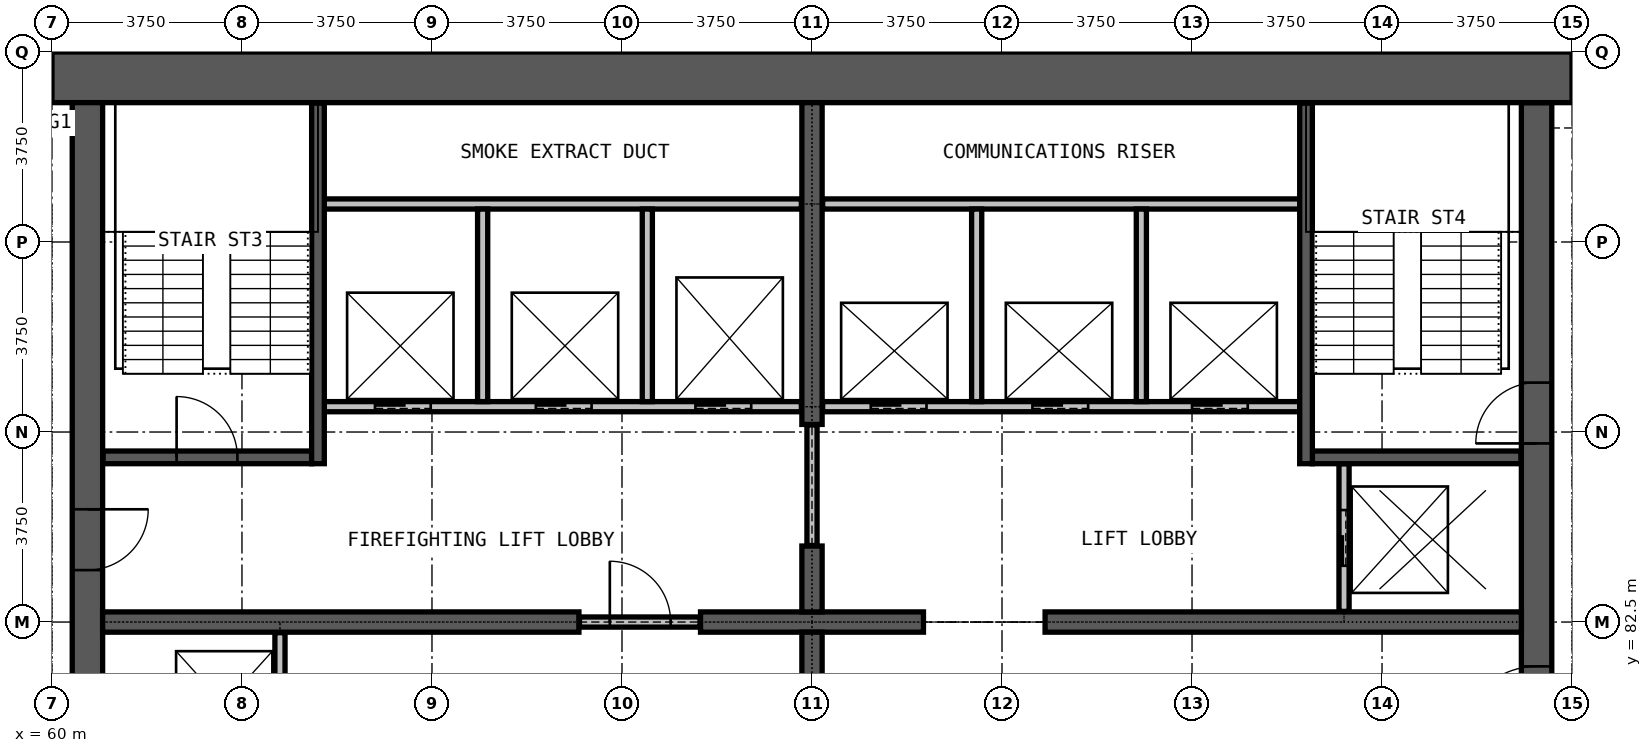
"""IFC4 building model, lengths in metres.
Left out: names, types, materials, properties, quantities, classifications, styles, units other than length and angle.
Written with IfcOpenShell. Run it as: python <this file> out.ifc"""

import sys

from ifc_helpers import new_model, si_unit, direction, frame, frame_2d, origin, place, context, subcontext, project, spatial, rectangle, extrude, element, fill, save


model = new_model("IFC4")
c1 = context("Model", 3, precision=1e-05, world=origin(), true_north=direction((0.0, 1.0)))
c2 = subcontext(c1, "Body", "Model", "MODEL_VIEW")
j1 = project(units=[si_unit("LENGTHUNIT", "METRE"), si_unit("PLANEANGLEUNIT", "RADIAN")], contexts=[c1])
p1 = place(None, origin())
s1 = spatial("IfcSite", under=j1, at=p1, CompositionType="ELEMENT")
p2 = place(p1, origin())
s2 = spatial("IfcBuilding", under=s1, at=p2, CompositionType="ELEMENT")
p3 = place(p2, frame((0.0, 0.0, 217.5)))
s3 = spatial("IfcBuildingStorey", under=s2, at=p3, CompositionType="ELEMENT", Elevation=217.5)
p4 = place(p3, frame((89.3, 72.25, 0.0), z_axis=(0.0, 0.0, 1.0), x_axis=(0.0, 1.0, 0.0)))
e1 = element("IfcWall", 1, at=p4, inside=s3, PredefinedType="SHEAR", context=c2, shape_type="SweptSolid", body=[
    extrude(rectangle(XDim=20.5, YDim=0.6, at=frame_2d((10.25, 0.0))), origin(), (0.0, 0.0, 1.0), 3.6),
])
p5 = place(p4, frame((0.275, 0.0, 0.0)))
e2 = element("IfcOpeningElement", 2, at=p5, cuts=e1, PredefinedType="OPENING", context=c2, shape_type="SweptSolid", body=[
    extrude(rectangle(XDim=1.2, YDim=2.2, at=frame_2d((0.6, 1.1))), frame((0.0, 0.31, 0.0), z_axis=(0.0, -1.0, 0.0), x_axis=(1.0, 0.0, 0.0)), (0.0, 0.0, 1.0), 0.62),
])
p6 = place(p4, frame((13.775, 0.0, 0.0)))
e3 = element("IfcOpeningElement", 3, at=p6, cuts=e1, PredefinedType="OPENING", context=c2, shape_type="SweptSolid", body=[
    extrude(rectangle(XDim=1.2, YDim=2.2, at=frame_2d((0.6, 1.1))), frame((0.0, 0.31, 0.0), z_axis=(0.0, -1.0, 0.0), x_axis=(1.0, 0.0, 0.0)), (0.0, 0.0, 1.0), 0.62),
])
p7 = place(p4, frame((7.875, 0.0, 0.0)))
e4 = element("IfcOpeningElement", 4, at=p7, cuts=e1, PredefinedType="OPENING", context=c2, shape_type="SweptSolid", body=[
    extrude(rectangle(XDim=1.5, YDim=2.2, at=frame_2d((0.75, 1.1))), frame((0.0, 0.31, 0.0), z_axis=(0.0, -1.0, 0.0), x_axis=(1.0, 0.0, 0.0)), (0.0, 0.0, 1.0), 0.62),
])
p8 = place(p3, frame((90.0, 93.25, 0.0), z_axis=(0.0, 0.0, 1.0), x_axis=(-1.0, 0.0, 0.0)))
e5 = element("IfcWall", 5, at=p8, inside=s3, PredefinedType="SHEAR", context=c2, shape_type="SweptSolid", body=[
    extrude(rectangle(XDim=30.0, YDim=1.0, at=frame_2d((15.0, 0.0))), origin(), (0.0, 0.0, 1.0), 3.6),
])
p9 = place(p3, frame((60.7, 92.75, 0.0), z_axis=(0.0, 0.0, 1.0), x_axis=(0.0, -1.0, 0.0)))
e6 = element("IfcWall", 6, at=p9, inside=s3, PredefinedType="SHEAR", context=c2, shape_type="SweptSolid", body=[
    extrude(rectangle(XDim=20.5, YDim=0.6, at=frame_2d((10.25, 0.0))), origin(), (0.0, 0.0, 1.0), 3.6),
])
p10 = place(p9, frame((19.025, 0.0, 0.0)))
e7 = element("IfcOpeningElement", 7, at=p10, cuts=e6, PredefinedType="OPENING", context=c2, shape_type="SweptSolid", body=[
    extrude(rectangle(XDim=1.2, YDim=2.2, at=frame_2d((0.6, 1.1))), frame((0.0, 0.31, 0.0), z_axis=(0.0, -1.0, 0.0), x_axis=(1.0, 0.0, 0.0)), (0.0, 0.0, 1.0), 0.62),
])
p11 = place(p9, frame((8.025, 0.0, 0.0)))
e8 = element("IfcOpeningElement", 8, at=p11, cuts=e6, PredefinedType="OPENING", context=c2, shape_type="SweptSolid", body=[
    extrude(rectangle(XDim=1.2, YDim=2.2, at=frame_2d((0.6, 1.1))), frame((0.0, 0.31, 0.0), z_axis=(0.0, -1.0, 0.0), x_axis=(1.0, 0.0, 0.0)), (0.0, 0.0, 1.0), 0.62),
])
p12 = place(p3, frame((61.0, 82.5, 0.0), z_axis=(0.0, 0.0, 1.0), x_axis=(1.0, 0.0, 0.0)))
e9 = element("IfcWall", 9, at=p12, inside=s3, PredefinedType="SHEAR", context=c2, shape_type="SweptSolid", body=[
    extrude(rectangle(XDim=9.4, YDim=0.4, at=frame_2d((4.7, 0.0))), origin(), (0.0, 0.0, 1.0), 3.6),
])
p13 = place(p3, frame((72.8, 82.5, 0.0), z_axis=(0.0, 0.0, 1.0), x_axis=(1.0, 0.0, 0.0)))
e10 = element("IfcWall", 10, at=p13, inside=s3, PredefinedType="SHEAR", context=c2, shape_type="SweptSolid", body=[
    extrude(rectangle(XDim=4.4, YDim=0.4, at=frame_2d((2.2, 0.0))), origin(), (0.0, 0.0, 1.0), 3.6),
])
p14 = place(p3, frame((79.6, 82.5, 0.0), z_axis=(0.0, 0.0, 1.0), x_axis=(1.0, 0.0, 0.0)))
e11 = element("IfcWall", 11, at=p14, inside=s3, PredefinedType="SHEAR", context=c2, shape_type="SweptSolid", body=[
    extrude(rectangle(XDim=9.4, YDim=0.4, at=frame_2d((4.7, 0.0))), origin(), (0.0, 0.0, 1.0), 3.6),
])
for number, where, z_axis, x_axis in (
    (12, (75.0, 81.0, 0.0), (0.0, 0.0, 1.0), (0.0, 1.0, 0.0)),
    (13, (75.0, 82.7, 0.0), (0.0, 0.0, 1.0), (0.0, 1.0, 0.0)),
):
    element("IfcWall", number, at=place(p3, frame(where, z_axis=z_axis, x_axis=x_axis)), inside=s3, PredefinedType="SHEAR", context=c2, shape_type="SweptSolid", body=[
        extrude(rectangle(XDim=1.3, YDim=0.4, at=frame_2d((0.65, 0.0))), origin(), (0.0, 0.0, 1.0), 3.6),
    ])
p15 = place(p3, frame((75.0, 86.4, 0.0), z_axis=(0.0, 0.0, 1.0), x_axis=(0.0, 1.0, 0.0)))
e14 = element("IfcWall", 14, at=p15, inside=s3, PredefinedType="SHEAR", context=c2, shape_type="SweptSolid", body=[
    extrude(rectangle(XDim=6.35, YDim=0.4, at=frame_2d((3.175, 0.0))), origin(), (0.0, 0.0, 1.0), 3.6),
])
p16 = place(p3, frame((70.41, 82.5, 0.0), z_axis=(0.0, 0.0, 1.0), x_axis=(1.0, 0.0, 0.0)))
e15 = element("IfcWall", 15, at=p16, inside=s3, PredefinedType="PARTITIONING", context=c2, shape_type="SweptSolid", body=[
    extrude(rectangle(XDim=2.38, YDim=0.2, at=frame_2d((1.19, 0.0))), origin(), (0.0, 0.0, 1.0), 2.4),
])
p17 = place(p16, frame((0.6, 0.0, 0.0)))
e16 = element("IfcOpeningElement", 16, at=p17, cuts=e15, PredefinedType="OPENING", context=c2, shape_type="SweptSolid", body=[
    extrude(rectangle(XDim=1.2, YDim=2.2, at=frame_2d((0.6, 1.1))), frame((0.0, 0.11, 0.0), z_axis=(0.0, -1.0, 0.0), x_axis=(1.0, 0.0, 0.0)), (0.0, 0.0, 1.0), 0.22),
])
p18 = place(p3, frame((75.0, 84.01, 0.0), z_axis=(0.0, 0.0, 1.0), x_axis=(0.0, 1.0, 0.0)))
e17 = element("IfcWall", 17, at=p18, inside=s3, PredefinedType="PARTITIONING", context=c2, shape_type="SweptSolid", body=[
    extrude(rectangle(XDim=2.38, YDim=0.2, at=frame_2d((1.19, 0.0))), origin(), (0.0, 0.0, 1.0), 2.4),
])
p19 = place(p3, frame((65.375, 86.75, 0.0), z_axis=(0.0, 0.0, 1.0), x_axis=(1.0, 0.0, 0.0)))
e18 = element("IfcWall", 18, at=p19, inside=s3, PredefinedType="PARTITIONING", context=c2, shape_type="SweptSolid", body=[
    extrude(rectangle(XDim=9.415, YDim=0.2, at=frame_2d((4.708, 0.0))), origin(), (0.0, 0.0, 1.0), 3.3),
])
p20 = place(p19, frame((1.0, 0.0, 0.0)))
e19 = element("IfcOpeningElement", 19, at=p20, cuts=e18, PredefinedType="OPENING", context=c2, shape_type="SweptSolid", body=[
    extrude(rectangle(XDim=1.1, YDim=2.2, at=frame_2d((0.55, 1.1))), frame((0.0, 0.11, 0.0), z_axis=(0.0, -1.0, 0.0), x_axis=(1.0, 0.0, 0.0)), (0.0, 0.0, 1.0), 0.22),
])
p21 = place(p19, frame((4.175, 0.0, 0.0)))
e20 = element("IfcOpeningElement", 20, at=p21, cuts=e18, PredefinedType="OPENING", context=c2, shape_type="SweptSolid", body=[
    extrude(rectangle(XDim=1.1, YDim=2.2, at=frame_2d((0.55, 1.1))), frame((0.0, 0.11, 0.0), z_axis=(0.0, -1.0, 0.0), x_axis=(1.0, 0.0, 0.0)), (0.0, 0.0, 1.0), 0.22),
])
p22 = place(p19, frame((7.325, 0.0, 0.0)))
e21 = element("IfcOpeningElement", 21, at=p22, cuts=e18, PredefinedType="OPENING", context=c2, shape_type="SweptSolid", body=[
    extrude(rectangle(XDim=1.1, YDim=2.2, at=frame_2d((0.55, 1.1))), frame((0.0, 0.11, 0.0), z_axis=(0.0, -1.0, 0.0), x_axis=(1.0, 0.0, 0.0)), (0.0, 0.0, 1.0), 0.22),
])
p23 = place(p3, frame((75.21, 86.75, 0.0), z_axis=(0.0, 0.0, 1.0), x_axis=(1.0, 0.0, 0.0)))
e22 = element("IfcWall", 22, at=p23, inside=s3, PredefinedType="PARTITIONING", context=c2, shape_type="SweptSolid", body=[
    extrude(rectangle(XDim=9.415, YDim=0.2, at=frame_2d((4.708, 0.0))), origin(), (0.0, 0.0, 1.0), 3.3),
])
p24 = place(p23, frame((0.95, 0.0, 0.0)))
e23 = element("IfcOpeningElement", 23, at=p24, cuts=e22, PredefinedType="OPENING", context=c2, shape_type="SweptSolid", body=[
    extrude(rectangle(XDim=1.1, YDim=2.2, at=frame_2d((0.55, 1.1))), frame((0.0, 0.11, 0.0), z_axis=(0.0, -1.0, 0.0), x_axis=(1.0, 0.0, 0.0)), (0.0, 0.0, 1.0), 0.22),
])
p25 = place(p23, frame((4.14, 0.0, 0.0)))
e24 = element("IfcOpeningElement", 24, at=p25, cuts=e22, PredefinedType="OPENING", context=c2, shape_type="SweptSolid", body=[
    extrude(rectangle(XDim=1.1, YDim=2.2, at=frame_2d((0.55, 1.1))), frame((0.0, 0.11, 0.0), z_axis=(0.0, -1.0, 0.0), x_axis=(1.0, 0.0, 0.0)), (0.0, 0.0, 1.0), 0.22),
])
p26 = place(p23, frame((7.29, 0.0, 0.0)))
e25 = element("IfcOpeningElement", 25, at=p26, cuts=e22, PredefinedType="OPENING", context=c2, shape_type="SweptSolid", body=[
    extrude(rectangle(XDim=1.1, YDim=2.2, at=frame_2d((0.55, 1.1))), frame((0.0, 0.11, 0.0), z_axis=(0.0, -1.0, 0.0), x_axis=(1.0, 0.0, 0.0)), (0.0, 0.0, 1.0), 0.22),
])
for number, where, z_axis, x_axis in (
    (26, (65.375, 90.75, 0.0), (0.0, 0.0, 1.0), (1.0, 0.0, 0.0)),
    (27, (75.21, 90.75, 0.0), (0.0, 0.0, 1.0), (1.0, 0.0, 0.0)),
):
    element("IfcWall", number, at=place(p3, frame(where, z_axis=z_axis, x_axis=x_axis)), inside=s3, PredefinedType="PARTITIONING", context=c2, shape_type="SweptSolid", body=[
        extrude(rectangle(XDim=9.415, YDim=0.2, at=frame_2d((4.708, 0.0))), origin(), (0.0, 0.0, 1.0), 3.3),
    ])
p27 = place(p3, frame((64.5, 79.375, 0.0), z_axis=(0.0, 0.0, 1.0), x_axis=(0.0, 1.0, 0.0)))
e28 = element("IfcWall", 28, at=p27, inside=s3, PredefinedType="PARTITIONING", context=c2, shape_type="SweptSolid", body=[
    extrude(rectangle(XDim=2.915, YDim=0.2, at=frame_2d((1.458, 0.0))), origin(), (0.0, 0.0, 1.0), 3.3),
])
for number, where, z_axis, x_axis in (
    (29, (68.5, 86.85, 0.0), (0.0, 0.0, 1.0), (0.0, 1.0, 0.0)),
    (30, (71.75, 86.85, 0.0), (0.0, 0.0, 1.0), (0.0, 1.0, 0.0)),
    (31, (78.25, 86.85, 0.0), (0.0, 0.0, 1.0), (0.0, 1.0, 0.0)),
    (32, (81.5, 86.85, 0.0), (0.0, 0.0, 1.0), (0.0, 1.0, 0.0)),
):
    element("IfcWall", number, at=place(p3, frame(where, z_axis=z_axis, x_axis=x_axis)), inside=s3, PredefinedType="PARTITIONING", context=c2, shape_type="SweptSolid", body=[
        extrude(rectangle(XDim=3.8, YDim=0.2, at=frame_2d((1.9, 0.0))), origin(), (0.0, 0.0, 1.0), 3.3),
    ])
p28 = place(p3, frame((85.5, 82.71, 0.0), z_axis=(0.0, 0.0, 1.0), x_axis=(0.0, 1.0, 0.0)))
e33 = element("IfcWall", 33, at=p28, inside=s3, PredefinedType="PARTITIONING", context=c2, shape_type="SweptSolid", body=[
    extrude(rectangle(XDim=2.915, YDim=0.2, at=frame_2d((1.458, 0.0))), origin(), (0.0, 0.0, 1.0), 3.3),
])
p29 = place(p28, frame((0.9, 0.0, 0.0)))
e34 = element("IfcOpeningElement", 34, at=p29, cuts=e33, PredefinedType="OPENING", context=c2, shape_type="SweptSolid", body=[
    extrude(rectangle(XDim=1.1, YDim=2.2, at=frame_2d((0.55, 1.1))), frame((0.0, 0.11, 0.0), z_axis=(0.0, -1.0, 0.0), x_axis=(1.0, 0.0, 0.0)), (0.0, 0.0, 1.0), 0.22),
])
p30 = place(p3, frame((61.01, 85.75, 0.0), z_axis=(0.0, 0.0, 1.0), x_axis=(1.0, 0.0, 0.0)))
e35 = element("IfcWall", 35, at=p30, inside=s3, PredefinedType="PARTITIONING", context=c2, shape_type="SweptSolid", body=[
    extrude(rectangle(XDim=4.115, YDim=0.25, at=frame_2d((2.058, 0.0))), origin(), (0.0, 0.0, 1.0), 3.3),
])
p31 = place(p30, frame((1.45, 0.0, 0.0)))
e36 = element("IfcOpeningElement", 36, at=p31, cuts=e35, PredefinedType="OPENING", context=c2, shape_type="SweptSolid", body=[
    extrude(rectangle(XDim=1.2, YDim=2.2, at=frame_2d((0.6, 1.1))), frame((0.0, 0.135, 0.0), z_axis=(0.0, -1.0, 0.0), x_axis=(1.0, 0.0, 0.0)), (0.0, 0.0, 1.0), 0.27),
])
p32 = place(p3, frame((84.875, 85.75, 0.0), z_axis=(0.0, 0.0, 1.0), x_axis=(1.0, 0.0, 0.0)))
e37 = element("IfcWall", 37, at=p32, inside=s3, PredefinedType="PARTITIONING", context=c2, shape_type="SweptSolid", body=[
    extrude(rectangle(XDim=4.115, YDim=0.25, at=frame_2d((2.058, 0.0))), origin(), (0.0, 0.0, 1.0), 3.3),
])
for number, where, z_axis, x_axis in (
    (38, (65.25, 85.625, 0.0), (0.0, 0.0, 1.0), (0.0, 1.0, 0.0)),
    (39, (84.75, 85.625, 0.0), (0.0, 0.0, 1.0), (0.0, 1.0, 0.0)),
):
    element("IfcWall", number, at=place(p3, frame(where, z_axis=z_axis, x_axis=x_axis)), inside=s3, PredefinedType="PARTITIONING", context=c2, shape_type="SweptSolid", body=[
        extrude(rectangle(XDim=7.115, YDim=0.25, at=frame_2d((3.558, 0.0))), origin(), (0.0, 0.0, 1.0), 3.3),
    ])
p33 = place(p24, origin())
e40 = element("IfcDoor", 40, at=p33, inside=s3, OperationType="DOUBLE_DOOR_SLIDING", PredefinedType="DOOR", context=c2, shape_type="SweptSolid", body=[
    extrude(rectangle(XDim=1.1, YDim=2.2, at=frame_2d((0.55, 1.1))), frame((0.0, 0.025, 0.0), z_axis=(0.0, -1.0, 0.0), x_axis=(1.0, 0.0, 0.0)), (0.0, 0.0, 1.0), 0.05),
])
fill(e23, e40)
p34 = place(p25, origin())
e41 = element("IfcDoor", 41, at=p34, inside=s3, OperationType="DOUBLE_DOOR_SLIDING", PredefinedType="DOOR", context=c2, shape_type="SweptSolid", body=[
    extrude(rectangle(XDim=1.1, YDim=2.2, at=frame_2d((0.55, 1.1))), frame((0.0, 0.025, 0.0), z_axis=(0.0, -1.0, 0.0), x_axis=(1.0, 0.0, 0.0)), (0.0, 0.0, 1.0), 0.05),
])
fill(e24, e41)
p35 = place(p26, origin())
e42 = element("IfcDoor", 42, at=p35, inside=s3, OperationType="DOUBLE_DOOR_SLIDING", PredefinedType="DOOR", context=c2, shape_type="SweptSolid", body=[
    extrude(rectangle(XDim=1.1, YDim=2.2, at=frame_2d((0.55, 1.1))), frame((0.0, 0.025, 0.0), z_axis=(0.0, -1.0, 0.0), x_axis=(1.0, 0.0, 0.0)), (0.0, 0.0, 1.0), 0.05),
])
fill(e25, e42)
p36 = place(p20, origin())
e43 = element("IfcDoor", 43, at=p36, inside=s3, OperationType="DOUBLE_DOOR_SLIDING", PredefinedType="DOOR", context=c2, shape_type="SweptSolid", body=[
    extrude(rectangle(XDim=1.1, YDim=2.2, at=frame_2d((0.55, 1.1))), frame((0.0, 0.025, 0.0), z_axis=(0.0, -1.0, 0.0), x_axis=(1.0, 0.0, 0.0)), (0.0, 0.0, 1.0), 0.05),
])
fill(e19, e43)
p37 = place(p21, origin())
e44 = element("IfcDoor", 44, at=p37, inside=s3, OperationType="DOUBLE_DOOR_SLIDING", PredefinedType="DOOR", context=c2, shape_type="SweptSolid", body=[
    extrude(rectangle(XDim=1.1, YDim=2.2, at=frame_2d((0.55, 1.1))), frame((0.0, 0.025, 0.0), z_axis=(0.0, -1.0, 0.0), x_axis=(1.0, 0.0, 0.0)), (0.0, 0.0, 1.0), 0.05),
])
fill(e20, e44)
p38 = place(p22, origin())
e45 = element("IfcDoor", 45, at=p38, inside=s3, OperationType="DOUBLE_DOOR_SLIDING", PredefinedType="DOOR", context=c2, shape_type="SweptSolid", body=[
    extrude(rectangle(XDim=1.1, YDim=2.2, at=frame_2d((0.55, 1.1))), frame((0.0, 0.025, 0.0), z_axis=(0.0, -1.0, 0.0), x_axis=(1.0, 0.0, 0.0)), (0.0, 0.0, 1.0), 0.05),
])
fill(e21, e45)
p39 = place(p29, origin())
e46 = element("IfcDoor", 46, at=p39, inside=s3, OperationType="DOUBLE_DOOR_SLIDING", PredefinedType="DOOR", context=c2, shape_type="SweptSolid", body=[
    extrude(rectangle(XDim=1.1, YDim=2.2, at=frame_2d((0.55, 1.1))), frame((0.0, 0.025, 0.0), z_axis=(0.0, -1.0, 0.0), x_axis=(1.0, 0.0, 0.0)), (0.0, 0.0, 1.0), 0.05),
])
fill(e34, e46)
p40 = place(p17, origin())
e47 = element("IfcDoor", 47, at=p40, inside=s3, OperationType="SINGLE_SWING_LEFT", PredefinedType="DOOR", context=c2, shape_type="SweptSolid", body=[
    extrude(rectangle(XDim=1.2, YDim=2.2, at=frame_2d((0.6, 1.1))), frame((0.0, 0.025, 0.0), z_axis=(0.0, -1.0, 0.0), x_axis=(1.0, 0.0, 0.0)), (0.0, 0.0, 1.0), 0.05),
])
fill(e16, e47)
p41 = place(p31, origin())
e48 = element("IfcDoor", 48, at=p41, inside=s3, OperationType="SINGLE_SWING_LEFT", PredefinedType="DOOR", context=c2, shape_type="SweptSolid", body=[
    extrude(rectangle(XDim=1.2, YDim=2.2, at=frame_2d((0.6, 1.1))), frame((0.0, 0.025, 0.0), z_axis=(0.0, -1.0, 0.0), x_axis=(1.0, 0.0, 0.0)), (0.0, 0.0, 1.0), 0.05),
])
fill(e36, e48)
p42 = place(p6, origin())
e49 = element("IfcDoor", 49, at=p42, inside=s3, OperationType="SINGLE_SWING_LEFT", PredefinedType="DOOR", context=c2, shape_type="SweptSolid", body=[
    extrude(rectangle(XDim=1.2, YDim=2.2, at=frame_2d((0.6, 1.1))), frame((0.0, 0.025, 0.0), z_axis=(0.0, -1.0, 0.0), x_axis=(1.0, 0.0, 0.0)), (0.0, 0.0, 1.0), 0.05),
])
fill(e3, e49)
p43 = place(p7, origin())
e50 = element("IfcDoor", 50, at=p43, inside=s3, OperationType="DOUBLE_DOOR_SINGLE_SWING", PredefinedType="DOOR", context=c2, shape_type="SweptSolid", body=[
    extrude(rectangle(XDim=1.5, YDim=2.2, at=frame_2d((0.75, 1.1))), frame((0.0, 0.025, 0.0), z_axis=(0.0, -1.0, 0.0), x_axis=(1.0, 0.0, 0.0)), (0.0, 0.0, 1.0), 0.05),
])
fill(e4, e50)
p44 = place(p11, origin())
e51 = element("IfcDoor", 51, at=p44, inside=s3, OperationType="SINGLE_SWING_RIGHT", PredefinedType="DOOR", context=c2, shape_type="SweptSolid", body=[
    extrude(rectangle(XDim=1.2, YDim=2.2, at=frame_2d((0.6, 1.1))), frame((0.0, 0.025, 0.0), z_axis=(0.0, -1.0, 0.0), x_axis=(1.0, 0.0, 0.0)), (0.0, 0.0, 1.0), 0.05),
])
fill(e8, e51)
save(model, sys.argv[1])
